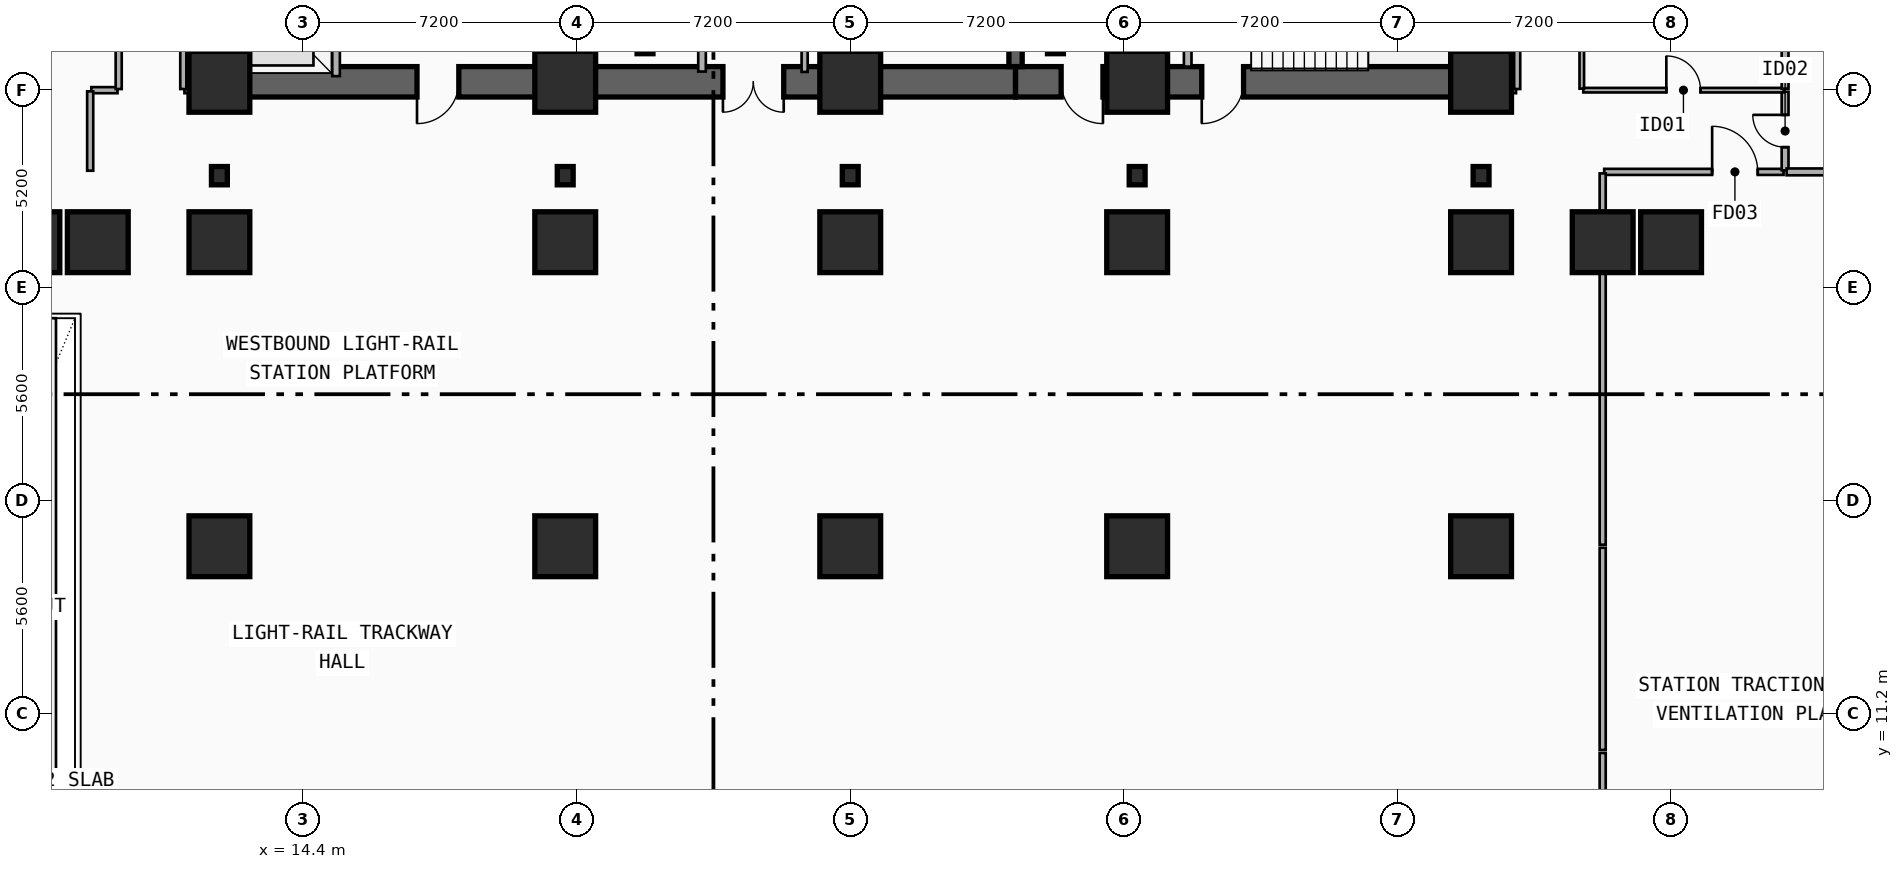
"""IFC4 building model, lengths in metres.
Left out: names, types, materials, properties, quantities, classifications, styles, units other than length and angle.
Written with IfcOpenShell. Run it as: python <this file> out.ifc"""

import sys

from ifc_helpers import new_model, si_unit, direction, frame, frame_2d, origin, origin_2d, place, context, subcontext, project, spatial, rectangle, i_section, extrude, element, fill, save


model = new_model("IFC4")
c1 = context("Model", 3, precision=1e-05, world=origin(), true_north=direction((0.0, 1.0)))
c2 = subcontext(c1, "Body", "Model", "MODEL_VIEW")
j1 = project(units=[si_unit("LENGTHUNIT", "METRE"), si_unit("PLANEANGLEUNIT", "RADIAN")], contexts=[c1])
p1 = place(None, origin())
s1 = spatial("IfcSite", under=j1, at=p1, CompositionType="ELEMENT")
p2 = place(p1, origin())
s2 = spatial("IfcBuilding", under=s1, at=p2, CompositionType="ELEMENT")
p3 = place(p2, frame((0.0, 0.0, -4.4)))
s3 = spatial("IfcBuildingStorey", under=s2, at=p3, CompositionType="ELEMENT", Elevation=-4.4)
p4 = place(p3, frame((21.18, 27.82, 0.0), z_axis=(0.0, 0.0, 1.0), x_axis=(-1.0, 0.0, 0.0)))
e1 = element("IfcWall", 1, at=p4, inside=s3, PredefinedType="SHEAR", context=c2, shape_type="SweptSolid", body=[
    extrude(rectangle(XDim=9.03, YDim=0.8, at=frame_2d((4.515, 0.0))), origin(), (0.0, 0.0, 1.0), 4.4),
])
p5 = place(p4, frame((2.68, 0.0, 0.0)))
e2 = element("IfcOpeningElement", 2, at=p5, cuts=e1, PredefinedType="OPENING", context=c2, shape_type="SweptSolid", body=[
    extrude(rectangle(XDim=1.1, YDim=2.15, at=frame_2d((0.55, 1.075))), frame((0.0, 0.41, 0.0), z_axis=(0.0, -1.0, 0.0), x_axis=(1.0, 0.0, 0.0)), (0.0, 0.0, 1.0), 0.82),
])
p6 = place(p3, frame((33.15, 27.82, 0.0), z_axis=(0.0, 0.0, 1.0), x_axis=(-1.0, 0.0, 0.0)))
e3 = element("IfcWall", 3, at=p6, inside=s3, PredefinedType="SHEAR", context=c2, shape_type="SweptSolid", body=[
    extrude(rectangle(XDim=11.97, YDim=0.8, at=frame_2d((5.985, 0.0))), origin(), (0.0, 0.0, 1.0), 4.4),
])
p7 = place(p6, frame((6.1, 0.0, 0.0)))
e4 = element("IfcOpeningElement", 4, at=p7, cuts=e3, PredefinedType="OPENING", context=c2, shape_type="SweptSolid", body=[
    extrude(rectangle(XDim=1.6, YDim=2.2, at=frame_2d((0.8, 1.1))), frame((0.0, 0.41, 0.0), z_axis=(0.0, -1.0, 0.0), x_axis=(1.0, 0.0, 0.0)), (0.0, 0.0, 1.0), 0.82),
])
p8 = place(p3, frame((45.38, 27.82, 0.0), z_axis=(0.0, 0.0, 1.0), x_axis=(-1.0, 0.0, 0.0)))
e5 = element("IfcWall", 5, at=p8, inside=s3, PredefinedType="SHEAR", context=c2, shape_type="SweptSolid", body=[
    extrude(rectangle(XDim=12.23, YDim=0.8, at=frame_2d((6.115, 0.0))), origin(), (0.0, 0.0, 1.0), 4.4),
])
p9 = place(p8, frame((9.93, 0.0, 0.0)))
e6 = element("IfcOpeningElement", 6, at=p9, cuts=e5, PredefinedType="OPENING", context=c2, shape_type="SweptSolid", body=[
    extrude(rectangle(XDim=1.1, YDim=2.15, at=frame_2d((0.55, 1.075))), frame((0.0, 0.41, 0.0), z_axis=(0.0, -1.0, 0.0), x_axis=(1.0, 0.0, 0.0)), (0.0, 0.0, 1.0), 0.82),
])
p10 = place(p8, frame((6.23, 0.0, 0.0)))
e7 = element("IfcOpeningElement", 7, at=p10, cuts=e5, PredefinedType="OPENING", context=c2, shape_type="SweptSolid", body=[
    extrude(rectangle(XDim=1.1, YDim=2.15, at=frame_2d((0.55, 1.075))), frame((0.0, 0.41, 0.0), z_axis=(0.0, -1.0, 0.0), x_axis=(1.0, 0.0, 0.0)), (0.0, 0.0, 1.0), 0.82),
])
for number, where, z_axis, x_axis in (
    (8, (12.15, 28.22, 0.0), (0.0, 0.0, 1.0), (0.0, 1.0, 0.0)),
    (9, (45.38, 28.22, 0.0), (0.0, 0.0, 1.0), (0.0, 1.0, 0.0)),
):
    element("IfcWall", number, at=place(p3, frame(where, z_axis=z_axis, x_axis=x_axis)), inside=s3, PredefinedType="SHEAR", context=c2, shape_type="SweptSolid", body=[
        extrude(rectangle(XDim=8.43, YDim=0.8, at=frame_2d((4.215, 0.0))), origin(), (0.0, 0.0, 1.0), 4.4),
    ])
for number, where, z_axis, x_axis in (
    (10, (21.18, 28.22, 0.0), (0.0, 0.0, 1.0), (0.0, 1.0, 0.0)),
    (11, (33.15, 28.22, 0.0), (0.0, 0.0, 1.0), (0.0, 1.0, 0.0)),
):
    element("IfcWall", number, at=place(p3, frame(where, z_axis=z_axis, x_axis=x_axis)), inside=s3, PredefinedType="SHEAR", context=c2, shape_type="SweptSolid", body=[
        extrude(rectangle(XDim=8.43, YDim=0.35, at=frame_2d((4.215, 0.0))), origin(), (0.0, 0.0, 1.0), 4.4),
    ])
p11 = place(p3, frame((36.38, 28.22, 0.0), z_axis=(0.0, 0.0, 1.0), x_axis=(0.0, 1.0, 0.0)))
e12 = element("IfcWall", 12, at=p11, inside=s3, PredefinedType="SHEAR", context=c2, shape_type="SweptSolid", body=[
    extrude(rectangle(XDim=8.43, YDim=0.35, at=frame_2d((4.215, 0.0))), origin(), (0.0, 0.0, 1.0), 4.4),
])
p12 = place(p11, frame((3.56, 0.0, 0.0)))
e13 = element("IfcOpeningElement", 13, at=p12, cuts=e12, PredefinedType="OPENING", context=c2, shape_type="SweptSolid", body=[
    extrude(rectangle(XDim=1.1, YDim=2.15, at=frame_2d((0.55, 1.075))), frame((0.0, 0.185, 0.0), z_axis=(0.0, -1.0, 0.0), x_axis=(1.0, 0.0, 0.0)), (0.0, 0.0, 1.0), 0.37),
])
for number, where, z_axis, x_axis in (
    (14, (23.4, 28.8, 0.0), (0.0, 0.0, 1.0), (1.0, 0.0, 0.0)),
    (15, (34.2, 28.8, 0.0), (0.0, 0.0, 1.0), (1.0, 0.0, 0.0)),
):
    element("IfcColumn", number, at=place(p3, frame(where, z_axis=z_axis, x_axis=x_axis)), inside=s3, PredefinedType="COLUMN", context=c2, shape_type="SweptSolid", body=[
        extrude(i_section(OverallWidth=0.418, OverallDepth=0.481, WebThickness=0.043, FlangeThickness=0.068, FilletRadius=0.015, at=origin_2d()), origin(), (0.0, 0.0, 1.0), 4.4),
    ])
for number, where, z_axis, x_axis in (
    (16, (12.2, 27.82, 0.0), (0.0, 0.0, 1.0), (1.0, 0.0, 0.0)),
    (17, (21.3, 27.82, 0.0), (0.0, 0.0, 1.0), (1.0, 0.0, 0.0)),
    (18, (28.8, 27.82, 0.0), (0.0, 0.0, 1.0), (1.0, 0.0, 0.0)),
    (19, (36.35, 27.82, 0.0), (0.0, 0.0, 1.0), (1.0, 0.0, 0.0)),
    (20, (45.4, 27.82, 0.0), (0.0, 0.0, 1.0), (1.0, 0.0, 0.0)),
):
    element("IfcColumn", number, at=place(p3, frame(where, z_axis=z_axis, x_axis=x_axis)), inside=s3, PredefinedType="COLUMN", context=c2, shape_type="SweptSolid", body=[
        extrude(rectangle(XDim=1.6, YDim=1.6, at=origin_2d()), origin(), (0.0, 0.0, 1.0), 4.4),
    ])
for number, where, z_axis, x_axis in (
    (21, (12.2, 25.35, 0.0), (0.0, 0.0, 1.0), (1.0, 0.0, 0.0)),
    (22, (21.3, 25.35, 0.0), (0.0, 0.0, 1.0), (1.0, 0.0, 0.0)),
    (23, (28.8, 25.35, 0.0), (0.0, 0.0, 1.0), (1.0, 0.0, 0.0)),
    (24, (36.35, 25.35, 0.0), (0.0, 0.0, 1.0), (1.0, 0.0, 0.0)),
    (25, (45.4, 25.35, 0.0), (0.0, 0.0, 1.0), (1.0, 0.0, 0.0)),
):
    element("IfcColumn", number, at=place(p3, frame(where, z_axis=z_axis, x_axis=x_axis)), inside=s3, PredefinedType="COLUMN", context=c2, shape_type="SweptSolid", body=[
        extrude(i_section(OverallWidth=0.418, OverallDepth=0.481, WebThickness=0.043, FlangeThickness=0.068, FilletRadius=0.015, at=origin_2d()), origin(), (0.0, 0.0, 1.0), 4.4),
    ])
for number, where, z_axis, x_axis in (
    (26, (7.2, 23.6, 0.0), (0.0, 0.0, 1.0), (1.0, 0.0, 0.0)),
    (27, (9.0, 23.6, 0.0), (0.0, 0.0, 1.0), (1.0, 0.0, 0.0)),
    (28, (12.2, 15.6, 0.0), (0.0, 0.0, 1.0), (1.0, 0.0, 0.0)),
    (29, (12.2, 23.6, 0.0), (0.0, 0.0, 1.0), (1.0, 0.0, 0.0)),
    (30, (21.3, 15.6, 0.0), (0.0, 0.0, 1.0), (1.0, 0.0, 0.0)),
    (31, (21.3, 23.6, 0.0), (0.0, 0.0, 1.0), (1.0, 0.0, 0.0)),
    (32, (28.8, 15.6, 0.0), (0.0, 0.0, 1.0), (1.0, 0.0, 0.0)),
    (33, (28.8, 23.6, 0.0), (0.0, 0.0, 1.0), (1.0, 0.0, 0.0)),
    (34, (36.35, 15.6, 0.0), (0.0, 0.0, 1.0), (1.0, 0.0, 0.0)),
    (35, (36.35, 23.6, 0.0), (0.0, 0.0, 1.0), (1.0, 0.0, 0.0)),
    (36, (45.4, 15.6, 0.0), (0.0, 0.0, 1.0), (1.0, 0.0, 0.0)),
    (37, (45.4, 23.6, 0.0), (0.0, 0.0, 1.0), (1.0, 0.0, 0.0)),
    (38, (48.6, 23.6, 0.0), (0.0, 0.0, 1.0), (1.0, 0.0, 0.0)),
    (39, (50.4, 23.6, 0.0), (0.0, 0.0, 1.0), (1.0, 0.0, 0.0)),
):
    element("IfcColumn", number, at=place(p3, frame(where, z_axis=z_axis, x_axis=x_axis)), inside=s3, PredefinedType="COLUMN", context=c2, shape_type="SweptSolid", body=[
        extrude(rectangle(XDim=1.6, YDim=1.6, at=origin_2d()), origin(), (0.0, 0.0, 1.0), 4.4),
    ])
p13 = place(p3, frame((15.27, 27.97, 0.0), z_axis=(0.0, 0.0, 1.0), x_axis=(0.0, 1.0, 0.0)))
e40 = element("IfcWall", 40, at=p13, inside=s3, PredefinedType="PARTITIONING", context=c2, shape_type="SweptSolid", body=[
    extrude(rectangle(XDim=2.96, YDim=0.2, at=frame_2d((1.48, 0.0))), origin(), (0.0, 0.0, 1.0), 3.022),
])
p14 = place(p13, frame((0.93, 0.0, 0.0)))
e41 = element("IfcOpeningElement", 41, at=p14, cuts=e40, PredefinedType="OPENING", context=c2, shape_type="SweptSolid", body=[
    extrude(rectangle(XDim=1.1, YDim=2.15, at=frame_2d((0.55, 1.075))), frame((0.0, 0.11, 0.0), z_axis=(0.0, -1.0, 0.0), x_axis=(1.0, 0.0, 0.0)), (0.0, 0.0, 1.0), 0.22),
])
p15 = place(p3, frame((37.68, 28.22, 0.0), z_axis=(0.0, 0.0, 1.0), x_axis=(0.0, 1.0, 0.0)))
e42 = element("IfcWall", 42, at=p15, inside=s3, PredefinedType="PARTITIONING", context=c2, shape_type="SweptSolid", body=[
    extrude(rectangle(XDim=3.03, YDim=0.2, at=frame_2d((1.515, 0.0))), origin(), (0.0, 0.0, 1.0), 4.05),
])
p16 = place(p3, frame((24.9, 28.09, 0.0), z_axis=(0.0, 0.0, 1.0), x_axis=(0.0, 1.0, 0.0)))
e43 = element("IfcWall", 43, at=p16, inside=s3, PredefinedType="PARTITIONING", context=c2, shape_type="SweptSolid", body=[
    extrude(rectangle(XDim=2.82, YDim=0.2, at=frame_2d((1.41, 0.0))), origin(), (0.0, 0.0, 1.0), 4.05),
])
p17 = place(p16, frame((1.201, 0.0, 0.0)))
e44 = element("IfcOpeningElement", 44, at=p17, cuts=e43, PredefinedType="OPENING", context=c2, shape_type="SweptSolid", body=[
    extrude(rectangle(XDim=1.2, YDim=2.15, at=frame_2d((0.6, 1.075))), frame((0.0, 0.11, 0.0), z_axis=(0.0, -1.0, 0.0), x_axis=(1.0, 0.0, 0.0)), (0.0, 0.0, 1.0), 0.22),
])
p18 = place(p3, frame((48.64, 25.45, 0.0), z_axis=(0.0, 0.0, 1.0), x_axis=(1.0, 0.0, 0.0)))
e45 = element("IfcWall", 45, at=p18, inside=s3, PredefinedType="PARTITIONING", context=c2, shape_type="SweptSolid", body=[
    extrude(rectangle(XDim=4.72, YDim=0.16, at=frame_2d((2.36, 0.0))), origin(), (0.0, 0.0, 1.0), 4.05),
])
p19 = place(p18, frame((2.84, 0.0, 0.0)))
e46 = element("IfcOpeningElement", 46, at=p19, cuts=e45, PredefinedType="OPENING", context=c2, shape_type="SweptSolid", body=[
    extrude(rectangle(XDim=1.2, YDim=2.15, at=frame_2d((0.6, 1.075))), frame((0.0, 0.09, 0.0), z_axis=(0.0, -1.0, 0.0), x_axis=(1.0, 0.0, 0.0)), (0.0, 0.0, 1.0), 0.18),
])
p20 = place(p3, frame((53.4, 25.49, 0.0), z_axis=(0.0, 0.0, 1.0), x_axis=(0.0, 1.0, 0.0)))
e47 = element("IfcWall", 47, at=p20, inside=s3, PredefinedType="PLUMBINGWALL", context=c2, shape_type="SweptSolid", body=[
    extrude(rectangle(XDim=2.07, YDim=0.18, at=frame_2d((1.035, 0.0))), origin(), (0.0, 0.0, 1.0), 4.05),
])
p21 = place(p20, frame((0.61, 0.0, 0.0)))
e48 = element("IfcOpeningElement", 48, at=p21, cuts=e47, PredefinedType="OPENING", context=c2, shape_type="SweptSolid", body=[
    extrude(rectangle(XDim=0.85, YDim=2.1, at=frame_2d((0.425, 1.05))), frame((0.0, 0.1, 0.0), z_axis=(0.0, -1.0, 0.0), x_axis=(1.0, 0.0, 0.0)), (0.0, 0.0, 1.0), 0.2),
])
p22 = place(p3, frame((48.09, 27.6, 0.0), z_axis=(0.0, 0.0, 1.0), x_axis=(1.0, 0.0, 0.0)))
e49 = element("IfcWall", 49, at=p22, inside=s3, PredefinedType="PARTITIONING", context=c2, shape_type="SweptSolid", body=[
    extrude(rectangle(XDim=5.27, YDim=0.12, at=frame_2d((2.635, 0.0))), origin(), (0.0, 0.0, 1.0), 4.05),
])
p23 = place(p22, frame((2.185, 0.0, 0.0)))
e50 = element("IfcOpeningElement", 50, at=p23, cuts=e49, PredefinedType="OPENING", context=c2, shape_type="SweptSolid", body=[
    extrude(rectangle(XDim=0.9, YDim=2.1, at=frame_2d((0.45, 1.05))), frame((0.0, 0.07, 0.0), z_axis=(0.0, -1.0, 0.0), x_axis=(1.0, 0.0, 0.0)), (0.0, 0.0, 1.0), 0.14),
])
p24 = place(p3, frame((48.05, 27.64, 0.0), z_axis=(0.0, 0.0, 1.0), x_axis=(0.0, 1.0, 0.0)))
e51 = element("IfcWall", 51, at=p24, inside=s3, PredefinedType="PARTITIONING", context=c2, shape_type="SweptSolid", body=[
    extrude(rectangle(XDim=10.27, YDim=0.12, at=frame_2d((5.135, 0.0))), origin(), (0.0, 0.0, 1.0), 4.05),
])
p25 = place(p24, frame((4.685, 0.0, 0.0)))
e52 = element("IfcOpeningElement", 52, at=p25, cuts=e51, PredefinedType="OPENING", context=c2, shape_type="SweptSolid", body=[
    extrude(rectangle(XDim=0.9, YDim=2.1, at=frame_2d((0.45, 1.05))), frame((0.0, 0.07, 0.0), z_axis=(0.0, -1.0, 0.0), x_axis=(1.0, 0.0, 0.0)), (0.0, 0.0, 1.0), 0.14),
])
p26 = place(p3, frame((48.6, 4.64, 0.0), z_axis=(0.0, 0.0, 1.0), x_axis=(0.0, 1.0, 0.0)))
e53 = element("IfcWall", 53, at=p26, inside=s3, PredefinedType="PARTITIONING", context=c2, shape_type="SweptSolid", body=[
    extrude(rectangle(XDim=5.52, YDim=0.16, at=frame_2d((2.76, 0.0))), origin(), (0.0, 0.0, 1.0), 2.63),
])
p27 = place(p3, frame((48.6, 10.24, 0.0), z_axis=(0.0, 0.0, 1.0), x_axis=(0.0, 1.0, 0.0)))
e54 = element("IfcWall", 54, at=p27, inside=s3, PredefinedType="PARTITIONING", context=c2, shape_type="SweptSolid", body=[
    extrude(rectangle(XDim=5.32, YDim=0.16, at=frame_2d((2.66, 0.0))), origin(), (0.0, 0.0, 1.0), 3.022),
])
p28 = place(p3, frame((48.6, 15.64, 0.0), z_axis=(0.0, 0.0, 1.0), x_axis=(0.0, 1.0, 0.0)))
e55 = element("IfcWall", 55, at=p28, inside=s3, PredefinedType="PARTITIONING", context=c2, shape_type="SweptSolid", body=[
    extrude(rectangle(XDim=9.77, YDim=0.16, at=frame_2d((4.885, 0.0))), origin(), (0.0, 0.0, 1.0), 2.63),
])
p29 = place(p3, frame((53.44, 25.45, 0.0), z_axis=(0.0, 0.0, 1.0), x_axis=(1.0, 0.0, 0.0)))
e56 = element("IfcWall", 56, at=p29, inside=s3, PredefinedType="PLUMBINGWALL", context=c2, shape_type="SweptSolid", body=[
    extrude(rectangle(XDim=3.12, YDim=0.18, at=frame_2d((1.56, 0.0))), origin(), (0.0, 0.0, 1.0), 4.05),
])
p30 = place(p3, frame((53.4, 27.64, 0.0), z_axis=(0.0, 0.0, 1.0), x_axis=(0.0, 1.0, 0.0)))
e57 = element("IfcWall", 57, at=p30, inside=s3, PredefinedType="PLUMBINGWALL", context=c2, shape_type="SweptSolid", body=[
    extrude(rectangle(XDim=4.12, YDim=0.18, at=frame_2d((2.06, 0.0))), origin(), (0.0, 0.0, 1.0), 4.05),
])
p31 = place(p3, frame((27.6, 28.08, 0.0), z_axis=(0.0, 0.0, 1.0), x_axis=(0.0, 1.0, 0.0)))
e58 = element("IfcWall", 58, at=p31, inside=s3, PredefinedType="PARTITIONING", context=c2, shape_type="SweptSolid", body=[
    extrude(rectangle(XDim=2.64, YDim=0.16, at=frame_2d((1.32, 0.0))), origin(), (0.0, 0.0, 1.0), 4.05),
])
p32 = place(p3, frame((8.83, 27.6, 0.0), z_axis=(0.0, 0.0, 1.0), x_axis=(1.0, 0.0, 0.0)))
e59 = element("IfcWall", 59, at=p32, inside=s3, PredefinedType="PARTITIONING", context=c2, shape_type="SweptSolid", body=[
    extrude(rectangle(XDim=0.69, YDim=0.16, at=frame_2d((0.345, 0.0))), origin(), (0.0, 0.0, 1.0), 4.05),
])
p33 = place(p3, frame((11.28, 27.6, 0.0), z_axis=(0.0, 0.0, 1.0), x_axis=(1.0, 0.0, 0.0)))
e60 = element("IfcWall", 60, at=p33, inside=s3, PredefinedType="PARTITIONING", context=c2, shape_type="SweptSolid", body=[
    extrude(rectangle(XDim=0.84, YDim=0.16, at=frame_2d((0.42, 0.0))), origin(), (0.0, 0.0, 1.0), 3.022),
])
p34 = place(p3, frame((45.41, 27.6, 0.0), z_axis=(0.0, 0.0, 1.0), x_axis=(1.0, 0.0, 0.0)))
e61 = element("IfcWall", 61, at=p34, inside=s3, PredefinedType="PARTITIONING", context=c2, shape_type="SweptSolid", body=[
    extrude(rectangle(XDim=0.91, YDim=0.16, at=frame_2d((0.455, 0.0))), origin(), (0.0, 0.0, 1.0), 3.022),
])
p35 = place(p3, frame((8.8, 25.48, 0.0), z_axis=(0.0, 0.0, 1.0), x_axis=(0.0, 1.0, 0.0)))
e62 = element("IfcWall", 62, at=p35, inside=s3, PredefinedType="PARTITIONING", context=c2, shape_type="SweptSolid", body=[
    extrude(rectangle(XDim=2.09, YDim=0.16, at=frame_2d((1.045, 0.0))), origin(), (0.0, 0.0, 1.0), 4.05),
])
p36 = place(p3, frame((9.55, 27.63, 0.0), z_axis=(0.0, 0.0, 1.0), x_axis=(0.0, 1.0, 0.0)))
e63 = element("IfcWall", 63, at=p36, inside=s3, PredefinedType="PARTITIONING", context=c2, shape_type="SweptSolid", body=[
    extrude(rectangle(XDim=10.29, YDim=0.16, at=frame_2d((5.145, 0.0))), origin(), (0.0, 0.0, 1.0), 4.05),
])
p37 = place(p3, frame((11.25, 27.63, 0.0), z_axis=(0.0, 0.0, 1.0), x_axis=(0.0, 1.0, 0.0)))
e64 = element("IfcWall", 64, at=p37, inside=s3, PredefinedType="PARTITIONING", context=c2, shape_type="SweptSolid", body=[
    extrude(rectangle(XDim=12.135, YDim=0.16, at=frame_2d((6.067, 0.0))), origin(), (0.0, 0.0, 1.0), 4.05),
])
p38 = place(p3, frame((46.35, 27.63, 0.0), z_axis=(0.0, 0.0, 1.0), x_axis=(0.0, 1.0, 0.0)))
e65 = element("IfcWall", 65, at=p38, inside=s3, PredefinedType="PARTITIONING", context=c2, shape_type="SweptSolid", body=[
    extrude(rectangle(XDim=12.34, YDim=0.16, at=frame_2d((6.17, 0.0))), origin(), (0.0, 0.0, 1.0), 4.05),
])
p39 = place(p5, origin())
e66 = element("IfcDoor", 66, at=p39, inside=s3, OperationType="SINGLE_SWING_RIGHT", PredefinedType="DOOR", context=c2, shape_type="SweptSolid", body=[
    extrude(rectangle(XDim=1.1, YDim=2.15, at=frame_2d((0.55, 1.075))), frame((0.0, 0.025, 0.0), z_axis=(0.0, -1.0, 0.0), x_axis=(1.0, 0.0, 0.0)), (0.0, 0.0, 1.0), 0.05),
])
fill(e2, e66)
p40 = place(p9, origin())
e67 = element("IfcDoor", 67, at=p40, inside=s3, OperationType="SINGLE_SWING_LEFT", PredefinedType="DOOR", context=c2, shape_type="SweptSolid", body=[
    extrude(rectangle(XDim=1.1, YDim=2.15, at=frame_2d((0.55, 1.075))), frame((0.0, 0.025, 0.0), z_axis=(0.0, -1.0, 0.0), x_axis=(1.0, 0.0, 0.0)), (0.0, 0.0, 1.0), 0.05),
])
fill(e6, e67)
p41 = place(p10, origin())
e68 = element("IfcDoor", 68, at=p41, inside=s3, OperationType="SINGLE_SWING_RIGHT", PredefinedType="DOOR", context=c2, shape_type="SweptSolid", body=[
    extrude(rectangle(XDim=1.1, YDim=2.15, at=frame_2d((0.55, 1.075))), frame((0.0, 0.025, 0.0), z_axis=(0.0, -1.0, 0.0), x_axis=(1.0, 0.0, 0.0)), (0.0, 0.0, 1.0), 0.05),
])
fill(e7, e68)
p42 = place(p7, origin())
e69 = element("IfcDoor", 69, at=p42, inside=s3, OperationType="SINGLE_SWING_LEFT", PredefinedType="DOOR", context=c2, shape_type="SweptSolid", body=[
    extrude(rectangle(XDim=1.6, YDim=2.2, at=frame_2d((0.8, 1.1))), frame((0.0, 0.025, 0.0), z_axis=(0.0, -1.0, 0.0), x_axis=(1.0, 0.0, 0.0)), (0.0, 0.0, 1.0), 0.05),
])
fill(e4, e69)
p43 = place(p19, origin())
e70 = element("IfcDoor", 70, at=p43, inside=s3, OperationType="SINGLE_SWING_LEFT", PredefinedType="DOOR", context=c2, shape_type="SweptSolid", body=[
    extrude(rectangle(XDim=1.2, YDim=2.15, at=frame_2d((0.6, 1.075))), frame((0.0, 0.025, 0.0), z_axis=(0.0, -1.0, 0.0), x_axis=(1.0, 0.0, 0.0)), (0.0, 0.0, 1.0), 0.05),
])
fill(e46, e70)
p44 = place(p21, origin())
e71 = element("IfcDoor", 71, at=p44, inside=s3, OperationType="SINGLE_SWING_RIGHT", PredefinedType="DOOR", context=c2, shape_type="SweptSolid", body=[
    extrude(rectangle(XDim=0.85, YDim=2.1, at=frame_2d((0.425, 1.05))), frame((0.0, 0.025, 0.0), z_axis=(0.0, -1.0, 0.0), x_axis=(1.0, 0.0, 0.0)), (0.0, 0.0, 1.0), 0.05),
])
fill(e48, e71)
p45 = place(p23, origin())
e72 = element("IfcDoor", 72, at=p45, inside=s3, OperationType="SINGLE_SWING_LEFT", PredefinedType="DOOR", context=c2, shape_type="SweptSolid", body=[
    extrude(rectangle(XDim=0.9, YDim=2.1, at=frame_2d((0.45, 1.05))), frame((0.0, 0.025, 0.0), z_axis=(0.0, -1.0, 0.0), x_axis=(1.0, 0.0, 0.0)), (0.0, 0.0, 1.0), 0.05),
])
fill(e50, e72)
save(model, sys.argv[1])
